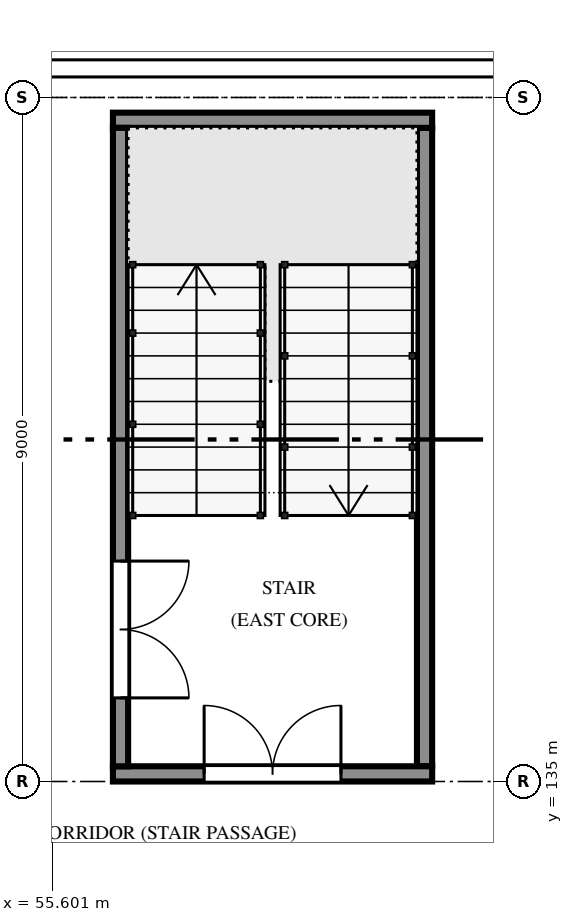
"""IFC4 building model, lengths in metres.
Left out: names, types, materials, properties, quantities, classifications, styles, units other than length and angle.
Written with IfcOpenShell. Run it as: python <this file> out.ifc"""

import sys

from ifc_helpers import new_model, si_unit, direction, frame, frame_2d, origin, place, context, subcontext, project, spatial, polyline, rectangle, outline, extrude, element, fill, save


model = new_model("IFC4")
c1 = context("Model", 3, precision=1e-05, world=origin(), true_north=direction((0.0, 1.0)))
c2 = subcontext(c1, "Body", "Model", "MODEL_VIEW")
j1 = project(units=[si_unit("LENGTHUNIT", "METRE"), si_unit("PLANEANGLEUNIT", "RADIAN")], contexts=[c1])
p1 = place(None, origin())
s1 = spatial("IfcSite", under=j1, at=p1, CompositionType="ELEMENT")
p2 = place(p1, origin())
s2 = spatial("IfcBuilding", under=s1, at=p2, CompositionType="ELEMENT")
p3 = place(p2, frame((0.0, 0.0, 7.5)))
s3 = spatial("IfcBuildingStorey", under=s2, at=p3, CompositionType="ELEMENT", Elevation=7.5)
p4 = place(p3, frame((56.4, 135.1, -0.13), z_axis=(0.0, 0.0, 1.0), x_axis=(1.0, 0.0, 0.0)))
e1 = element("IfcWall", 1, at=p4, inside=s3, PredefinedType="SOLIDWALL", context=c2, shape_type="SweptSolid", body=[
    extrude(rectangle(XDim=4.2, YDim=0.2, at=frame_2d((2.1, 0.0))), origin(), (0.0, 0.0, 1.0), 3.587),
])
p5 = place(p4, frame((1.2, 0.0, 0.13)))
e2 = element("IfcOpeningElement", 2, at=p5, cuts=e1, PredefinedType="OPENING", context=c2, shape_type="SweptSolid", body=[
    extrude(rectangle(XDim=1.8, YDim=2.1, at=frame_2d((0.9, 1.05))), frame((0.0, 0.11, 0.0), z_axis=(0.0, -1.0, 0.0), x_axis=(1.0, 0.0, 0.0)), (0.0, 0.0, 1.0), 0.22),
])
p6 = place(p3, frame((56.4, 143.7, 0.0), z_axis=(0.0, 0.0, 1.0), x_axis=(1.0, 0.0, 0.0)))
e3 = element("IfcWall", 3, at=p6, inside=s3, PredefinedType="SOLIDWALL", context=c2, shape_type="SweptSolid", body=[
    extrude(rectangle(XDim=4.2, YDim=0.2, at=frame_2d((2.1, 0.0))), origin(), (0.0, 0.0, 1.0), 3.457),
])
p7 = place(p3, frame((56.5, 135.2, -0.13), z_axis=(0.0, 0.0, 1.0), x_axis=(0.0, 1.0, 0.0)))
e4 = element("IfcWall", 4, at=p7, inside=s3, PredefinedType="SOLIDWALL", context=c2, shape_type="SweptSolid", body=[
    extrude(rectangle(XDim=8.4, YDim=0.2, at=frame_2d((4.2, 0.0))), origin(), (0.0, 0.0, 1.0), 3.587),
])
p8 = place(p7, frame((0.9, 0.0, 0.13)))
e5 = element("IfcOpeningElement", 5, at=p8, cuts=e4, PredefinedType="OPENING", context=c2, shape_type="SweptSolid", body=[
    extrude(rectangle(XDim=1.8, YDim=2.1, at=frame_2d((0.9, 1.05))), frame((0.0, 0.11, 0.0), z_axis=(0.0, -1.0, 0.0), x_axis=(1.0, 0.0, 0.0)), (0.0, 0.0, 1.0), 0.22),
])
p9 = place(p3, frame((60.5, 135.2, -0.13), z_axis=(0.0, 0.0, 1.0), x_axis=(0.0, 1.0, 0.0)))
e6 = element("IfcWall", 6, at=p9, inside=s3, PredefinedType="SOLIDWALL", context=c2, shape_type="SweptSolid", body=[
    extrude(rectangle(XDim=8.4, YDim=0.2, at=frame_2d((4.2, 0.0))), origin(), (0.0, 0.0, 1.0), 3.587),
])
p10 = place(p8, frame((1.8, 0.0, 0.0), z_axis=(0.0, 0.0, 1.0), x_axis=(-1.0, 0.0, 0.0)))
e7 = element("IfcDoor", 7, at=p10, inside=s3, OperationType="DOUBLE_DOOR_SINGLE_SWING", PredefinedType="DOOR", context=c2, shape_type="SweptSolid", body=[
    extrude(outline(polyline([(0.0, 0.0), (0.07, 0.0), (0.07, 2.03), (1.73, 2.03), (1.73, 0.0), (1.8, 0.0), (1.8, 2.1), (0.0, 2.1), (0.0, 0.0)])), frame((0.0, 0.025, 0.0), z_axis=(0.0, -1.0, 0.0), x_axis=(1.0, 0.0, 0.0)), (0.0, 0.0, 1.0), 0.05),
    extrude(outline(polyline([(0.074, 0.01), (0.897, 0.01), (0.897, 2.026), (0.074, 2.026), (0.074, 0.01)]), holes=[polyline([(0.194, 0.16), (0.777, 0.16), (0.777, 1.01), (0.194, 1.01), (0.194, 0.16)]), polyline([(0.335, 1.16), (0.635, 1.16), (0.635, 1.76), (0.335, 1.76), (0.335, 1.16)])]), frame((0.0, 0.017, 0.0), z_axis=(0.0, -1.0, 0.0), x_axis=(1.0, 0.0, 0.0)), (0.0, 0.0, 1.0), 0.035),
    extrude(rectangle(XDim=0.583, YDim=0.85, at=frame_2d((0.485, 0.585))), frame((0.0, 0.009, 0.0), z_axis=(0.0, -1.0, 0.0), x_axis=(1.0, 0.0, 0.0)), (0.0, 0.0, 1.0), 0.017),
    extrude(rectangle(XDim=0.3, YDim=0.6, at=frame_2d((0.485, 1.46))), frame((0.0, 0.006, 0.0), z_axis=(0.0, -1.0, 0.0), x_axis=(1.0, 0.0, 0.0)), (0.0, 0.0, 1.0), 0.012),
    extrude(outline(polyline([(0.903, 0.01), (1.726, 0.01), (1.726, 2.026), (0.903, 2.026), (0.903, 0.01)]), holes=[polyline([(1.023, 0.16), (1.606, 0.16), (1.606, 1.01), (1.023, 1.01), (1.023, 0.16)]), polyline([(1.165, 1.16), (1.465, 1.16), (1.465, 1.76), (1.165, 1.76), (1.165, 1.16)])]), frame((0.0, 0.017, 0.0), z_axis=(0.0, -1.0, 0.0), x_axis=(1.0, 0.0, 0.0)), (0.0, 0.0, 1.0), 0.035),
    extrude(rectangle(XDim=0.583, YDim=0.85, at=frame_2d((1.314, 0.585))), frame((0.0, 0.009, 0.0), z_axis=(0.0, -1.0, 0.0), x_axis=(1.0, 0.0, 0.0)), (0.0, 0.0, 1.0), 0.017),
    extrude(rectangle(XDim=0.3, YDim=0.6, at=frame_2d((1.314, 1.46))), frame((0.0, 0.006, 0.0), z_axis=(0.0, -1.0, 0.0), x_axis=(1.0, 0.0, 0.0)), (0.0, 0.0, 1.0), 0.012),
])
fill(e5, e7)
p11 = place(p5, origin())
e8 = element("IfcDoor", 8, at=p11, inside=s3, OperationType="DOUBLE_DOOR_SINGLE_SWING", PredefinedType="DOOR", context=c2, shape_type="SweptSolid", body=[
    extrude(outline(polyline([(0.0, 0.0), (0.07, 0.0), (0.07, 2.03), (1.73, 2.03), (1.73, 0.0), (1.8, 0.0), (1.8, 2.1), (0.0, 2.1), (0.0, 0.0)])), frame((0.0, 0.025, 0.0), z_axis=(0.0, -1.0, 0.0), x_axis=(1.0, 0.0, 0.0)), (0.0, 0.0, 1.0), 0.05),
    extrude(outline(polyline([(0.074, 0.01), (0.897, 0.01), (0.897, 2.026), (0.074, 2.026), (0.074, 0.01)]), holes=[polyline([(0.194, 0.16), (0.777, 0.16), (0.777, 1.01), (0.194, 1.01), (0.194, 0.16)]), polyline([(0.335, 1.16), (0.635, 1.16), (0.635, 1.76), (0.335, 1.76), (0.335, 1.16)])]), frame((0.0, 0.017, 0.0), z_axis=(0.0, -1.0, 0.0), x_axis=(1.0, 0.0, 0.0)), (0.0, 0.0, 1.0), 0.035),
    extrude(rectangle(XDim=0.583, YDim=0.85, at=frame_2d((0.485, 0.585))), frame((0.0, 0.009, 0.0), z_axis=(0.0, -1.0, 0.0), x_axis=(1.0, 0.0, 0.0)), (0.0, 0.0, 1.0), 0.017),
    extrude(rectangle(XDim=0.3, YDim=0.6, at=frame_2d((0.485, 1.46))), frame((0.0, 0.006, 0.0), z_axis=(0.0, -1.0, 0.0), x_axis=(1.0, 0.0, 0.0)), (0.0, 0.0, 1.0), 0.012),
    extrude(outline(polyline([(0.903, 0.01), (1.726, 0.01), (1.726, 2.026), (0.903, 2.026), (0.903, 0.01)]), holes=[polyline([(1.023, 0.16), (1.606, 0.16), (1.606, 1.01), (1.023, 1.01), (1.023, 0.16)]), polyline([(1.165, 1.16), (1.465, 1.16), (1.465, 1.76), (1.165, 1.76), (1.165, 1.16)])]), frame((0.0, 0.017, 0.0), z_axis=(0.0, -1.0, 0.0), x_axis=(1.0, 0.0, 0.0)), (0.0, 0.0, 1.0), 0.035),
    extrude(rectangle(XDim=0.583, YDim=0.85, at=frame_2d((1.314, 0.585))), frame((0.0, 0.009, 0.0), z_axis=(0.0, -1.0, 0.0), x_axis=(1.0, 0.0, 0.0)), (0.0, 0.0, 1.0), 0.017),
    extrude(rectangle(XDim=0.3, YDim=0.6, at=frame_2d((1.314, 1.46))), frame((0.0, 0.006, 0.0), z_axis=(0.0, -1.0, 0.0), x_axis=(1.0, 0.0, 0.0)), (0.0, 0.0, 1.0), 0.012),
])
fill(e2, e8)
save(model, sys.argv[1])
